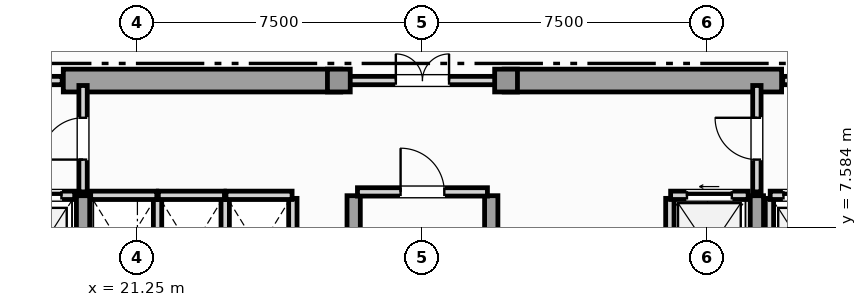
"""IFC4 building model, lengths in metres.
Left out: names, types, materials, properties, quantities, classifications, styles, units other than length and angle.
Written with IfcOpenShell. Run it as: python <this file> out.ifc"""

import sys

from ifc_helpers import new_model, si_unit, direction, frame, frame_2d, origin, origin_2d, place, context, subcontext, project, spatial, rectangle, extrude, element, fill, save


model = new_model("IFC4")
c1 = context("Model", 3, precision=1e-05, world=origin(), true_north=direction((0.0, 1.0)))
c2 = subcontext(c1, "Body", "Model", "MODEL_VIEW")
j1 = project(units=[si_unit("LENGTHUNIT", "METRE"), si_unit("PLANEANGLEUNIT", "RADIAN")], contexts=[c1])
p1 = place(None, origin())
s1 = spatial("IfcSite", under=j1, at=p1, CompositionType="ELEMENT")
p2 = place(p1, origin())
s2 = spatial("IfcBuilding", under=s1, at=p2, CompositionType="ELEMENT")
p3 = place(p2, frame((0.0, 0.0, 208.0)))
s3 = spatial("IfcBuildingStorey", under=s2, at=p3, CompositionType="ELEMENT", Elevation=208.0)
for number, where, z_axis, x_axis in (
    (1, (19.3, 11.45, 0.0), (0.0, 0.0, 1.0), (1.0, 0.0, 0.0)),
    (2, (30.9, 11.45, 0.0), (0.0, 0.0, 1.0), (1.0, 0.0, 0.0)),
):
    element("IfcWall", number, at=place(p3, frame(where, z_axis=z_axis, x_axis=x_axis)), inside=s3, PredefinedType="SHEAR", context=c2, shape_type="SweptSolid", body=[
        extrude(rectangle(XDim=7.3, YDim=0.6, at=frame_2d((3.65, 0.0))), origin(), (0.0, 0.0, 1.0), 3.63),
    ])
for number, where, z_axis, x_axis in (
    (3, (19.82, 0.92, 0.0), (0.0, 0.0, 1.0), (0.0, 1.0, 0.0)),
    (4, (26.94, 0.92, 0.0), (0.0, 0.0, 1.0), (0.0, 1.0, 0.0)),
    (5, (30.56, 0.92, 0.0), (0.0, 0.0, 1.0), (0.0, 1.0, 0.0)),
    (6, (37.55, 0.92, 0.0), (0.0, 0.0, 1.0), (0.0, 1.0, 0.0)),
):
    element("IfcWall", number, at=place(p3, frame(where, z_axis=z_axis, x_axis=x_axis)), inside=s3, PredefinedType="SHEAR", context=c2, shape_type="SweptSolid", body=[
        extrude(rectangle(XDim=7.5, YDim=0.35, at=frame_2d((3.75, 0.0))), origin(), (0.0, 0.0, 1.0), 3.63),
    ])
for number, where, z_axis, x_axis in (
    (7, (26.55, 11.45, 0.0), (0.0, 0.0, 1.0), (1.0, 0.0, 0.0)),
    (8, (30.95, 11.45, 0.0), (0.0, 0.0, 1.0), (1.0, 0.0, 0.0)),
):
    element("IfcColumn", number, at=place(p3, frame(where, z_axis=z_axis, x_axis=x_axis)), inside=s3, PredefinedType="COLUMN", context=c2, shape_type="SweptSolid", body=[
        extrude(rectangle(XDim=0.6, YDim=0.6, at=origin_2d()), origin(), (0.0, 0.0, 1.0), 3.85),
    ])
p4 = place(p3, frame((17.78, 8.43, 0.0), z_axis=(0.0, 0.0, 1.0), x_axis=(1.0, 0.0, 0.0)))
e9 = element("IfcWall", 9, at=p4, inside=s3, PredefinedType="SOLIDWALL", context=c2, shape_type="SweptSolid", body=[
    extrude(rectangle(XDim=1.82, YDim=0.22, at=frame_2d((0.91, 0.0))), origin(), (0.0, 0.0, 1.0), 3.63),
])
p5 = place(p4, frame((0.35, 0.0, 0.0)))
e10 = element("IfcOpeningElement", 10, at=p5, cuts=e9, PredefinedType="OPENING", context=c2, shape_type="SweptSolid", body=[
    extrude(rectangle(XDim=1.12, YDim=2.25, at=frame_2d((0.56, 1.125))), frame((0.0, 0.12, 0.0), z_axis=(0.0, -1.0, 0.0), x_axis=(1.0, 0.0, 0.0)), (0.0, 0.0, 1.0), 0.24),
])
p6 = place(p3, frame((37.88, 5.65, 0.0), z_axis=(0.0, 0.0, 1.0), x_axis=(0.0, 1.0, 0.0)))
e11 = element("IfcWall", 11, at=p6, inside=s3, PredefinedType="SOLIDWALL", context=c2, shape_type="SweptSolid", body=[
    extrude(rectangle(XDim=2.7, YDim=0.22, at=frame_2d((1.35, 0.0))), origin(), (0.0, 0.0, 1.0), 3.63),
])
p7 = place(p3, frame((37.9, 8.43, 0.0), z_axis=(0.0, 0.0, 1.0), x_axis=(1.0, 0.0, 0.0)))
e12 = element("IfcWall", 12, at=p7, inside=s3, PredefinedType="SOLIDWALL", context=c2, shape_type="SweptSolid", body=[
    extrude(rectangle(XDim=1.82, YDim=0.22, at=frame_2d((0.91, 0.0))), origin(), (0.0, 0.0, 1.0), 3.63),
])
p8 = place(p7, frame((0.35, 0.0, 0.0)))
e13 = element("IfcOpeningElement", 13, at=p8, cuts=e12, PredefinedType="OPENING", context=c2, shape_type="SweptSolid", body=[
    extrude(rectangle(XDim=1.12, YDim=2.25, at=frame_2d((0.56, 1.125))), frame((0.0, 0.12, 0.0), z_axis=(0.0, -1.0, 0.0), x_axis=(1.0, 0.0, 0.0)), (0.0, 0.0, 1.0), 0.24),
])
p9 = place(p3, frame((35.26, 5.65, 0.0), z_axis=(0.0, 0.0, 1.0), x_axis=(0.0, 1.0, 0.0)))
e14 = element("IfcWall", 14, at=p9, inside=s3, PredefinedType="SOLIDWALL", context=c2, shape_type="SweptSolid", body=[
    extrude(rectangle(XDim=2.7, YDim=0.22, at=frame_2d((1.35, 0.0))), origin(), (0.0, 0.0, 1.0), 3.63),
])
p10 = place(p3, frame((35.28, 8.43, 0.0), z_axis=(0.0, 0.0, 1.0), x_axis=(1.0, 0.0, 0.0)))
e15 = element("IfcWall", 15, at=p10, inside=s3, PredefinedType="SOLIDWALL", context=c2, shape_type="SweptSolid", body=[
    extrude(rectangle(XDim=2.04, YDim=0.22, at=frame_2d((1.02, 0.0))), origin(), (0.0, 0.0, 1.0), 3.63),
])
p11 = place(p10, frame((0.43, 0.0, 0.0)))
e16 = element("IfcOpeningElement", 16, at=p11, cuts=e15, PredefinedType="OPENING", context=c2, shape_type="SweptSolid", body=[
    extrude(rectangle(XDim=1.18, YDim=2.2, at=frame_2d((0.59, 1.1))), frame((0.0, 0.12, 0.0), z_axis=(0.0, -1.0, 0.0), x_axis=(1.0, 0.0, 0.0)), (0.0, 0.0, 1.0), 0.24),
])
p12 = place(p3, frame((21.78, 5.65, 0.0), z_axis=(0.0, 0.0, 1.0), x_axis=(0.0, 1.0, 0.0)))
e17 = element("IfcWall", 17, at=p12, inside=s3, PredefinedType="SOLIDWALL", context=c2, shape_type="SweptSolid", body=[
    extrude(rectangle(XDim=2.7, YDim=0.22, at=frame_2d((1.35, 0.0))), origin(), (0.0, 0.0, 1.0), 3.63),
])
p13 = place(p3, frame((20.02, 8.43, 0.0), z_axis=(0.0, 0.0, 1.0), x_axis=(1.0, 0.0, 0.0)))
e18 = element("IfcWall", 18, at=p13, inside=s3, PredefinedType="SOLIDWALL", context=c2, shape_type="SweptSolid", body=[
    extrude(rectangle(XDim=1.74, YDim=0.22, at=frame_2d((0.87, 0.0))), origin(), (0.0, 0.0, 1.0), 3.63),
])
p14 = place(p3, frame((23.56, 5.65, 0.0), z_axis=(0.0, 0.0, 1.0), x_axis=(0.0, 1.0, 0.0)))
e19 = element("IfcWall", 19, at=p14, inside=s3, PredefinedType="SOLIDWALL", context=c2, shape_type="SweptSolid", body=[
    extrude(rectangle(XDim=2.7, YDim=0.22, at=frame_2d((1.35, 0.0))), origin(), (0.0, 0.0, 1.0), 3.63),
])
p15 = place(p3, frame((21.8, 8.43, 0.0), z_axis=(0.0, 0.0, 1.0), x_axis=(1.0, 0.0, 0.0)))
e20 = element("IfcWall", 20, at=p15, inside=s3, PredefinedType="SOLIDWALL", context=c2, shape_type="SweptSolid", body=[
    extrude(rectangle(XDim=1.74, YDim=0.22, at=frame_2d((0.87, 0.0))), origin(), (0.0, 0.0, 1.0), 3.63),
])
p16 = place(p3, frame((25.34, 5.65, 0.0), z_axis=(0.0, 0.0, 1.0), x_axis=(0.0, 1.0, 0.0)))
e21 = element("IfcWall", 21, at=p16, inside=s3, PredefinedType="SOLIDWALL", context=c2, shape_type="SweptSolid", body=[
    extrude(rectangle(XDim=2.7, YDim=0.22, at=frame_2d((1.35, 0.0))), origin(), (0.0, 0.0, 1.0), 3.63),
])
p17 = place(p3, frame((23.58, 8.43, 0.0), z_axis=(0.0, 0.0, 1.0), x_axis=(1.0, 0.0, 0.0)))
e22 = element("IfcWall", 22, at=p17, inside=s3, PredefinedType="SOLIDWALL", context=c2, shape_type="SweptSolid", body=[
    extrude(rectangle(XDim=1.74, YDim=0.22, at=frame_2d((0.87, 0.0))), origin(), (0.0, 0.0, 1.0), 3.63),
])
p18 = place(p3, frame((27.04, 8.52, 0.0), z_axis=(0.0, 0.0, 1.0), x_axis=(1.0, 0.0, 0.0)))
e23 = element("IfcWall", 23, at=p18, inside=s3, PredefinedType="SOLIDWALL", context=c2, shape_type="SweptSolid", body=[
    extrude(rectangle(XDim=3.42, YDim=0.22, at=frame_2d((1.71, 0.0))), origin(), (0.0, 0.0, 1.0), 3.63),
])
p19 = place(p18, frame((1.135, 0.0, 0.0)))
e24 = element("IfcOpeningElement", 24, at=p19, cuts=e23, PredefinedType="OPENING", context=c2, shape_type="SweptSolid", body=[
    extrude(rectangle(XDim=1.15, YDim=2.2, at=frame_2d((0.575, 1.1))), frame((0.0, 0.12, 0.0), z_axis=(0.0, -1.0, 0.0), x_axis=(1.0, 0.0, 0.0)), (0.0, 0.0, 1.0), 0.24),
])
p20 = place(p3, frame((19.82, 8.52, 0.0), z_axis=(0.0, 0.0, 1.0), x_axis=(0.0, 1.0, 0.0)))
e25 = element("IfcWall", 25, at=p20, inside=s3, PredefinedType="SOLIDWALL", context=c2, shape_type="SweptSolid", body=[
    extrude(rectangle(XDim=2.8, YDim=0.22, at=frame_2d((1.4, 0.0))), origin(), (0.0, 0.0, 1.0), 3.085),
])
p21 = place(p20, frame((0.85, 0.0, 0.0)))
e26 = element("IfcOpeningElement", 26, at=p21, cuts=e25, PredefinedType="OPENING", context=c2, shape_type="SweptSolid", body=[
    extrude(rectangle(XDim=1.1, YDim=2.2, at=frame_2d((0.55, 1.1))), frame((0.0, 0.12, 0.0), z_axis=(0.0, -1.0, 0.0), x_axis=(1.0, 0.0, 0.0)), (0.0, 0.0, 1.0), 0.24),
])
p22 = place(p3, frame((37.55, 8.52, 0.0), z_axis=(0.0, 0.0, 1.0), x_axis=(0.0, 1.0, 0.0)))
e27 = element("IfcWall", 27, at=p22, inside=s3, PredefinedType="SOLIDWALL", context=c2, shape_type="SweptSolid", body=[
    extrude(rectangle(XDim=2.8, YDim=0.22, at=frame_2d((1.4, 0.0))), origin(), (0.0, 0.0, 1.0), 3.085),
])
p23 = place(p22, frame((0.85, 0.0, 0.0)))
e28 = element("IfcOpeningElement", 28, at=p23, cuts=e27, PredefinedType="OPENING", context=c2, shape_type="SweptSolid", body=[
    extrude(rectangle(XDim=1.1, YDim=2.2, at=frame_2d((0.55, 1.1))), frame((0.0, 0.12, 0.0), z_axis=(0.0, -1.0, 0.0), x_axis=(1.0, 0.0, 0.0)), (0.0, 0.0, 1.0), 0.24),
])
p24 = place(p3, frame((16.23, 11.45, 0.0), z_axis=(0.0, 0.0, 1.0), x_axis=(1.0, 0.0, 0.0)))
e29 = element("IfcWall", 29, at=p24, inside=s3, PredefinedType="SOLIDWALL", context=c2, shape_type="SweptSolid", body=[
    extrude(rectangle(XDim=3.04, YDim=0.22, at=frame_2d((1.52, 0.0))), origin(), (0.0, 0.0, 1.0), 3.63),
])
p25 = place(p24, frame((0.97, 0.0, 0.0)))
e30 = element("IfcOpeningElement", 30, at=p25, cuts=e29, PredefinedType="OPENING", context=c2, shape_type="SweptSolid", body=[
    extrude(rectangle(XDim=1.1, YDim=2.2, at=frame_2d((0.55, 1.1))), frame((0.0, 0.12, 0.0), z_axis=(0.0, -1.0, 0.0), x_axis=(1.0, 0.0, 0.0)), (0.0, 0.0, 1.0), 0.24),
])
p26 = place(p3, frame((26.63, 11.45, 0.0), z_axis=(0.0, 0.0, 1.0), x_axis=(1.0, 0.0, 0.0)))
e31 = element("IfcWall", 31, at=p26, inside=s3, PredefinedType="SOLIDWALL", context=c2, shape_type="SweptSolid", body=[
    extrude(rectangle(XDim=4.24, YDim=0.22, at=frame_2d((2.12, 0.0))), origin(), (0.0, 0.0, 1.0), 3.63),
])
p27 = place(p26, frame((1.42, 0.0, 0.0)))
e32 = element("IfcOpeningElement", 32, at=p27, cuts=e31, PredefinedType="OPENING", context=c2, shape_type="SweptSolid", body=[
    extrude(rectangle(XDim=1.4, YDim=2.2, at=frame_2d((0.7, 1.1))), frame((0.0, 0.12, 0.0), z_axis=(0.0, -1.0, 0.0), x_axis=(1.0, 0.0, 0.0)), (0.0, 0.0, 1.0), 0.24),
])
p28 = place(p3, frame((38.23, 11.45, 0.0), z_axis=(0.0, 0.0, 1.0), x_axis=(1.0, 0.0, 0.0)))
e33 = element("IfcWall", 33, at=p28, inside=s3, PredefinedType="SOLIDWALL", context=c2, shape_type="SweptSolid", body=[
    extrude(rectangle(XDim=3.04, YDim=0.22, at=frame_2d((1.52, 0.0))), origin(), (0.0, 0.0, 1.0), 3.63),
])
p29 = place(p28, frame((0.97, 0.0, 0.0)))
e34 = element("IfcOpeningElement", 34, at=p29, cuts=e33, PredefinedType="OPENING", context=c2, shape_type="SweptSolid", body=[
    extrude(rectangle(XDim=1.1, YDim=2.2, at=frame_2d((0.55, 1.1))), frame((0.0, 0.12, 0.0), z_axis=(0.0, -1.0, 0.0), x_axis=(1.0, 0.0, 0.0)), (0.0, 0.0, 1.0), 0.24),
])
p30 = place(p5, origin())
e35 = element("IfcDoor", 35, at=p30, inside=s3, OperationType="SLIDING_TO_LEFT", PredefinedType="DOOR", context=c2, shape_type="SweptSolid", body=[
    extrude(rectangle(XDim=1.12, YDim=2.25, at=frame_2d((0.56, 1.125))), frame((0.0, 0.025, 0.0), z_axis=(0.0, -1.0, 0.0), x_axis=(1.0, 0.0, 0.0)), (0.0, 0.0, 1.0), 0.05),
])
fill(e10, e35)
p31 = place(p8, origin())
e36 = element("IfcDoor", 36, at=p31, inside=s3, OperationType="SLIDING_TO_RIGHT", PredefinedType="DOOR", context=c2, shape_type="SweptSolid", body=[
    extrude(rectangle(XDim=1.12, YDim=2.25, at=frame_2d((0.56, 1.125))), frame((0.0, 0.025, 0.0), z_axis=(0.0, -1.0, 0.0), x_axis=(1.0, 0.0, 0.0)), (0.0, 0.0, 1.0), 0.05),
])
fill(e13, e36)
p32 = place(p11, origin())
e37 = element("IfcDoor", 37, at=p32, inside=s3, OperationType="SLIDING_TO_LEFT", PredefinedType="DOOR", context=c2, shape_type="SweptSolid", body=[
    extrude(rectangle(XDim=1.18, YDim=2.2, at=frame_2d((0.59, 1.1))), frame((0.0, 0.025, 0.0), z_axis=(0.0, -1.0, 0.0), x_axis=(1.0, 0.0, 0.0)), (0.0, 0.0, 1.0), 0.05),
])
fill(e16, e37)
p33 = place(p19, origin())
e38 = element("IfcDoor", 38, at=p33, inside=s3, OperationType="SINGLE_SWING_LEFT", PredefinedType="DOOR", context=c2, shape_type="SweptSolid", body=[
    extrude(rectangle(XDim=1.15, YDim=2.2, at=frame_2d((0.575, 1.1))), frame((0.0, 0.025, 0.0), z_axis=(0.0, -1.0, 0.0), x_axis=(1.0, 0.0, 0.0)), (0.0, 0.0, 1.0), 0.05),
])
fill(e24, e38)
p34 = place(p21, origin())
e39 = element("IfcDoor", 39, at=p34, inside=s3, OperationType="SINGLE_SWING_LEFT", PredefinedType="DOOR", context=c2, shape_type="SweptSolid", body=[
    extrude(rectangle(XDim=1.1, YDim=2.2, at=frame_2d((0.55, 1.1))), frame((0.0, 0.025, 0.0), z_axis=(0.0, -1.0, 0.0), x_axis=(1.0, 0.0, 0.0)), (0.0, 0.0, 1.0), 0.05),
])
fill(e26, e39)
p35 = place(p23, origin())
e40 = element("IfcDoor", 40, at=p35, inside=s3, OperationType="SINGLE_SWING_RIGHT", PredefinedType="DOOR", context=c2, shape_type="SweptSolid", body=[
    extrude(rectangle(XDim=1.1, YDim=2.2, at=frame_2d((0.55, 1.1))), frame((0.0, 0.025, 0.0), z_axis=(0.0, -1.0, 0.0), x_axis=(1.0, 0.0, 0.0)), (0.0, 0.0, 1.0), 0.05),
])
fill(e28, e40)
p36 = place(p27, origin())
e41 = element("IfcDoor", 41, at=p36, inside=s3, OperationType="DOUBLE_DOOR_SINGLE_SWING", PredefinedType="DOOR", context=c2, shape_type="SweptSolid", body=[
    extrude(rectangle(XDim=1.4, YDim=2.2, at=frame_2d((0.7, 1.1))), frame((0.0, 0.025, 0.0), z_axis=(0.0, -1.0, 0.0), x_axis=(1.0, 0.0, 0.0)), (0.0, 0.0, 1.0), 0.05),
])
fill(e32, e41)
save(model, sys.argv[1])
